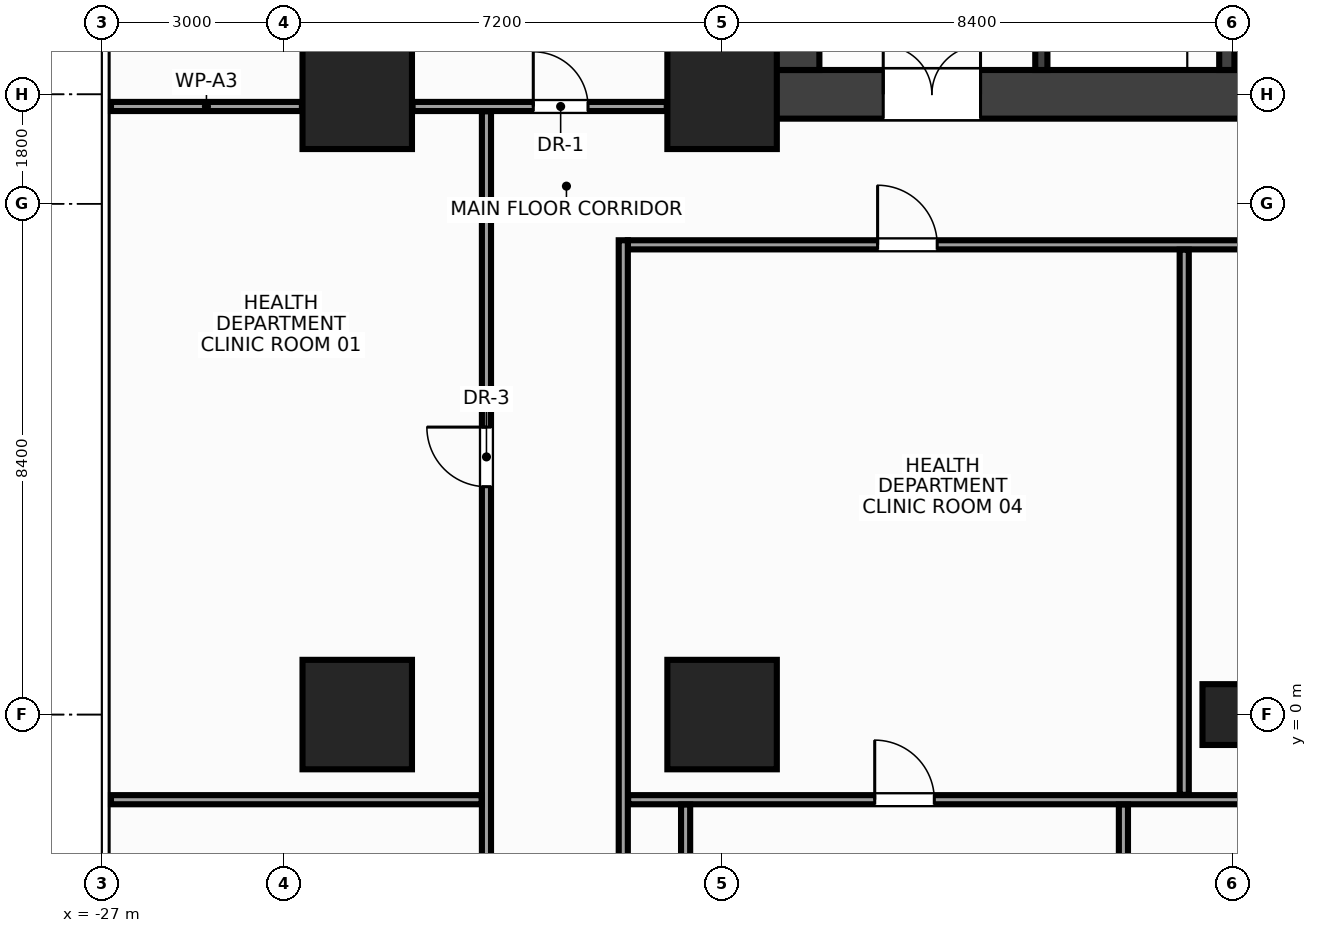
"""IFC4 building model, lengths in metres.
Left out: names, types, materials, properties, quantities, classifications, styles, units other than length and angle.
Written with IfcOpenShell. Run it as: python <this file> out.ifc"""

import sys

from ifc_helpers import new_model, si_unit, direction, frame, frame_2d, origin, origin_2d, place, context, subcontext, project, spatial, rectangle, hollow_rectangle, extrude, source, transform, mapped, element, fill, save


model = new_model("IFC4")
c1 = context("Model", 3, precision=1e-05, world=origin(), true_north=direction((0.0, 1.0)))
c2 = subcontext(c1, "Body", "Model", "MODEL_VIEW")
j1 = project(units=[si_unit("LENGTHUNIT", "METRE"), si_unit("PLANEANGLEUNIT", "RADIAN")], contexts=[c1])
p1 = place(None, origin())
s1 = spatial("IfcSite", under=j1, at=p1, CompositionType="ELEMENT")
p2 = place(p1, origin())
s2 = spatial("IfcBuilding", under=s1, at=p2, CompositionType="ELEMENT")
p3 = place(p2, frame((0.0, 0.0, 52.4)))
s3 = spatial("IfcBuildingStorey", under=s2, at=p3, CompositionType="ELEMENT", Elevation=52.4)
m1 = source(origin(), c2, "Body", "SweptSolid", [
    extrude(rectangle(XDim=32.0, YDim=0.8, at=frame_2d((16.0, 0.0))), origin(), (0.0, 0.0, 1.0), 3.6),
])
p4 = place(p3, frame((-16.0, 10.2, 0.0), z_axis=(0.0, 0.0, 1.0), x_axis=(1.0, 0.0, 0.0)))
e1 = element("IfcWall", 1, at=p4, inside=s3, PredefinedType="SHEAR", context=c2, shape_type="MappedRepresentation", body=[
    mapped(m1, transform((0.0, 0.0, 0.0), x_axis=(1.0, 0.0, 0.0), y_axis=(0.0, 1.0, 0.0), z_axis=(0.0, 0.0, 1.0), scale=1.0)),
])
p5 = place(p4, frame((1.85, 0.0, 0.0)))
e2 = element("IfcOpeningElement", 2, at=p5, cuts=e1, PredefinedType="OPENING", context=c2, shape_type="SweptSolid", body=[
    extrude(rectangle(XDim=1.6, YDim=2.15, at=frame_2d((0.8, 1.075))), frame((0.0, 0.412, 0.0), z_axis=(0.0, -1.0, 0.0), x_axis=(1.0, 0.0, 0.0)), (0.0, 0.0, 1.0), 0.824),
])
p6 = place(p4, frame((28.55, 0.0, 0.0)))
e3 = element("IfcOpeningElement", 3, at=p6, cuts=e1, PredefinedType="OPENING", context=c2, shape_type="SweptSolid", body=[
    extrude(rectangle(XDim=1.6, YDim=2.15, at=frame_2d((0.8, 1.075))), frame((0.0, 0.412, 0.0), z_axis=(0.0, -1.0, 0.0), x_axis=(1.0, 0.0, 0.0)), (0.0, 0.0, 1.0), 0.824),
])
p7 = place(p4, frame((15.25, 0.0, 0.0)))
e4 = element("IfcOpeningElement", 4, at=p7, cuts=e1, PredefinedType="OPENING", context=c2, shape_type="SweptSolid", body=[
    extrude(rectangle(XDim=1.5, YDim=2.2, at=frame_2d((0.75, 1.1))), frame((0.0, 0.412, 0.0), z_axis=(0.0, -1.0, 0.0), x_axis=(1.0, 0.0, 0.0)), (0.0, 0.0, 1.0), 0.824),
])
m2 = source(origin(), c2, "Body", "SweptSolid", [
    extrude(rectangle(XDim=12.8, YDim=0.8, at=frame_2d((6.4, 0.0))), origin(), (0.0, 0.0, 1.0), 3.6),
])
p8 = place(p3, frame((-15.6, 10.6, 0.0), z_axis=(0.0, 0.0, 1.0), x_axis=(0.0, 1.0, 0.0)))
e5 = element("IfcWall", 5, at=p8, inside=s3, PredefinedType="SHEAR", context=c2, shape_type="MappedRepresentation", body=[
    mapped(m2, transform((0.0, 0.0, 0.0), x_axis=(1.0, 0.0, 0.0), y_axis=(0.0, 1.0, 0.0), z_axis=(0.0, 0.0, 1.0), scale=1.0)),
])
m3 = source(origin(), c2, "Body", "SweptSolid", [
    extrude(rectangle(XDim=12.8, YDim=0.25, at=frame_2d((6.4, 0.0))), origin(), (0.0, 0.0, 1.0), 3.6),
])
p9 = place(p3, frame((-8.5, 10.6, 0.0), z_axis=(0.0, 0.0, 1.0), x_axis=(0.0, 1.0, 0.0)))
e6 = element("IfcWall", 6, at=p9, inside=s3, PredefinedType="SHEAR", context=c2, shape_type="MappedRepresentation", body=[
    mapped(m3, transform((0.0, 0.0, 0.0), x_axis=(1.0, 0.0, 0.0), y_axis=(0.0, 1.0, 0.0), z_axis=(0.0, 0.0, 1.0), scale=1.0)),
])
p10 = place(p9, frame((5.9, 0.0, 0.0)))
e7 = element("IfcOpeningElement", 7, at=p10, cuts=e6, PredefinedType="OPENING", context=c2, shape_type="SweptSolid", body=[
    extrude(rectangle(XDim=0.95, YDim=2.15, at=frame_2d((0.475, 1.075))), frame((0.0, 0.137, 0.0), z_axis=(0.0, -1.0, 0.0), x_axis=(1.0, 0.0, 0.0)), (0.0, 0.0, 1.0), 0.274),
])
m4 = source(origin(), c2, "Body", "SweptSolid", [
    extrude(rectangle(XDim=3.05, YDim=0.2, at=frame_2d((1.525, 0.0))), origin(), (0.0, 0.0, 1.0), 3.6),
])
p11 = place(p3, frame((-11.55, 10.6, 0.0), z_axis=(0.0, 0.0, 1.0), x_axis=(0.0, 1.0, 0.0)))
e8 = element("IfcWall", 8, at=p11, inside=s3, PredefinedType="SHEAR", context=c2, shape_type="MappedRepresentation", body=[
    mapped(m4, transform((0.0, 0.0, 0.0), x_axis=(1.0, 0.0, 0.0), y_axis=(0.0, 1.0, 0.0), z_axis=(0.0, 0.0, 1.0), scale=1.0)),
])
p12 = place(p11, frame((0.9, 0.0, 0.0)))
e9 = element("IfcOpeningElement", 9, at=p12, cuts=e8, PredefinedType="OPENING", context=c2, shape_type="SweptSolid", body=[
    extrude(rectangle(XDim=1.1, YDim=2.15, at=frame_2d((0.55, 1.075))), frame((0.0, 0.112, 0.0), z_axis=(0.0, -1.0, 0.0), x_axis=(1.0, 0.0, 0.0)), (0.0, 0.0, 1.0), 0.224),
])
m5 = source(origin(), c2, "Body", "SweptSolid", [
    extrude(rectangle(XDim=1.8, YDim=1.8, at=origin_2d()), origin(), (0.0, 0.0, 1.0), 3.6),
])
for number, where, z_axis, x_axis in (
    (10, (-16.8, 0.0, 0.0), (0.0, 0.0, 1.0), (1.0, 0.0, 0.0)),
    (11, (-16.8, 10.2, 0.0), (0.0, 0.0, 1.0), (1.0, 0.0, 0.0)),
    (12, (-22.8, 0.0, 0.0), (0.0, 0.0, 1.0), (1.0, 0.0, 0.0)),
    (13, (-22.8, 10.2, 0.0), (0.0, 0.0, 1.0), (1.0, 0.0, 0.0)),
):
    element("IfcColumn", number, at=place(p3, frame(where, z_axis=z_axis, x_axis=x_axis)), inside=s3, PredefinedType="COLUMN", context=c2, shape_type="MappedRepresentation", body=[
        mapped(m5, transform((0.0, 0.0, 0.0), x_axis=(1.0, 0.0, 0.0), y_axis=(0.0, 1.0, 0.0), z_axis=(0.0, 0.0, 1.0), scale=1.0)),
    ])
m6 = source(origin(), c2, "Body", "SweptSolid", [
    extrude(hollow_rectangle(XDim=1.0, YDim=1.0, WallThickness=0.045, at=origin_2d()), origin(), (0.0, 0.0, 1.0), 3.6),
])
p13 = place(p3, frame((-8.4, 0.0, 0.0), z_axis=(0.0, 0.0, 1.0), x_axis=(1.0, 0.0, 0.0)))
e14 = element("IfcColumn", 14, at=p13, inside=s3, PredefinedType="COLUMN", context=c2, shape_type="MappedRepresentation", body=[
    mapped(m6, transform((0.0, 0.0, 0.0), x_axis=(1.0, 0.0, 0.0), y_axis=(0.0, 1.0, 0.0), z_axis=(0.0, 0.0, 1.0), scale=1.0)),
])
m7 = source(origin(), c2, "Body", "SweptSolid", [
    extrude(rectangle(XDim=3.14, YDim=0.15, at=frame_2d((1.57, 0.0))), origin(), (0.0, 0.0, 1.0), 2.435),
])
p14 = place(p3, frame((-26.85, 10.0, 0.0), z_axis=(0.0, 0.0, 1.0), x_axis=(1.0, 0.0, 0.0)))
e15 = element("IfcWall", 15, at=p14, inside=s3, PredefinedType="PARTITIONING", context=c2, shape_type="MappedRepresentation", body=[
    mapped(m7, transform((0.0, 0.0, 0.0), x_axis=(1.0, 0.0, 0.0), y_axis=(0.0, 1.0, 0.0), z_axis=(0.0, 0.0, 1.0), scale=1.0)),
])
m8 = source(origin(), c2, "Body", "SweptSolid", [
    extrude(rectangle(XDim=4.18, YDim=0.15, at=frame_2d((2.09, 0.0))), origin(), (0.0, 0.0, 1.0), 2.745),
])
p15 = place(p3, frame((-21.89, 10.0, 0.0), z_axis=(0.0, 0.0, 1.0), x_axis=(1.0, 0.0, 0.0)))
e16 = element("IfcWall", 16, at=p15, inside=s3, PredefinedType="PARTITIONING", context=c2, shape_type="MappedRepresentation", body=[
    mapped(m8, transform((0.0, 0.0, 0.0), x_axis=(1.0, 0.0, 0.0), y_axis=(0.0, 1.0, 0.0), z_axis=(0.0, 0.0, 1.0), scale=1.0)),
])
p16 = place(p15, frame((1.985, 0.0, 0.0)))
e17 = element("IfcOpeningElement", 17, at=p16, cuts=e16, PredefinedType="OPENING", context=c2, shape_type="SweptSolid", body=[
    extrude(rectangle(XDim=0.9, YDim=2.15, at=frame_2d((0.45, 1.075))), frame((0.0, 0.087, 0.0), z_axis=(0.0, -1.0, 0.0), x_axis=(1.0, 0.0, 0.0)), (0.0, 0.0, 1.0), 0.174),
])
m9 = source(origin(), c2, "Body", "SweptSolid", [
    extrude(rectangle(XDim=36.7, YDim=0.15, at=frame_2d((18.35, 0.0))), origin(), (0.0, 0.0, 1.0), 2.745),
])
p17 = place(p3, frame((-18.35, 7.725, 0.0), z_axis=(0.0, 0.0, 1.0), x_axis=(1.0, 0.0, 0.0)))
e18 = element("IfcWall", 18, at=p17, inside=s3, PredefinedType="PARTITIONING", context=c2, shape_type="MappedRepresentation", body=[
    mapped(m9, transform((0.0, 0.0, 0.0), x_axis=(1.0, 0.0, 0.0), y_axis=(0.0, 1.0, 0.0), z_axis=(0.0, 0.0, 1.0), scale=1.0)),
])
p18 = place(p17, frame((33.312, 0.0, 0.0)))
e19 = element("IfcOpeningElement", 19, at=p18, cuts=e18, PredefinedType="OPENING", context=c2, shape_type="SweptSolid", body=[
    extrude(rectangle(XDim=0.98, YDim=2.15, at=frame_2d((0.49, 1.075))), frame((0.0, 0.087, 0.0), z_axis=(0.0, -1.0, 0.0), x_axis=(1.0, 0.0, 0.0)), (0.0, 0.0, 1.0), 0.174),
])
p19 = place(p17, frame((4.107, 0.0, 0.0)))
e20 = element("IfcOpeningElement", 20, at=p19, cuts=e18, PredefinedType="OPENING", context=c2, shape_type="SweptSolid", body=[
    extrude(rectangle(XDim=0.98, YDim=2.15, at=frame_2d((0.49, 1.075))), frame((0.0, 0.087, 0.0), z_axis=(0.0, -1.0, 0.0), x_axis=(1.0, 0.0, 0.0)), (0.0, 0.0, 1.0), 0.174),
])
p20 = place(p17, frame((14.46, 0.0, 0.0)))
e21 = element("IfcOpeningElement", 21, at=p20, cuts=e18, PredefinedType="OPENING", context=c2, shape_type="SweptSolid", body=[
    extrude(rectangle(XDim=0.98, YDim=2.15, at=frame_2d((0.49, 1.075))), frame((0.0, 0.087, 0.0), z_axis=(0.0, -1.0, 0.0), x_axis=(1.0, 0.0, 0.0)), (0.0, 0.0, 1.0), 0.174),
])
p21 = place(p17, frame((25.36, 0.0, 0.0)))
e22 = element("IfcOpeningElement", 22, at=p21, cuts=e18, PredefinedType="OPENING", context=c2, shape_type="SweptSolid", body=[
    extrude(rectangle(XDim=0.98, YDim=2.15, at=frame_2d((0.49, 1.075))), frame((0.0, 0.087, 0.0), z_axis=(0.0, -1.0, 0.0), x_axis=(1.0, 0.0, 0.0)), (0.0, 0.0, 1.0), 0.174),
])
m10 = source(origin(), c2, "Body", "SweptSolid", [
    extrude(rectangle(XDim=24.115, YDim=0.15, at=frame_2d((12.058, 0.0))), origin(), (0.0, 0.0, 1.0), 2.745),
])
p22 = place(p3, frame((-20.675, -14.195, 0.0), z_axis=(0.0, 0.0, 1.0), x_axis=(0.0, 1.0, 0.0)))
e23 = element("IfcWall", 23, at=p22, inside=s3, PredefinedType="PARTITIONING", context=c2, shape_type="MappedRepresentation", body=[
    mapped(m10, transform((0.0, 0.0, 0.0), x_axis=(1.0, 0.0, 0.0), y_axis=(0.0, 1.0, 0.0), z_axis=(0.0, 0.0, 1.0), scale=1.0)),
])
p23 = place(p22, frame((17.942, 0.0, 0.0)))
e24 = element("IfcOpeningElement", 24, at=p23, cuts=e23, PredefinedType="OPENING", context=c2, shape_type="SweptSolid", body=[
    extrude(rectangle(XDim=0.98, YDim=2.15, at=frame_2d((0.49, 1.075))), frame((0.0, 0.087, 0.0), z_axis=(0.0, -1.0, 0.0), x_axis=(1.0, 0.0, 0.0)), (0.0, 0.0, 1.0), 0.174),
])
m11 = source(origin(), c2, "Body", "SweptSolid", [
    extrude(rectangle(XDim=21.995, YDim=0.15, at=frame_2d((10.998, 0.0))), origin(), (0.0, 0.0, 1.0), 2.745),
])
p24 = place(p3, frame((-18.425, -14.195, 0.0), z_axis=(0.0, 0.0, 1.0), x_axis=(0.0, 1.0, 0.0)))
e25 = element("IfcWall", 25, at=p24, inside=s3, PredefinedType="PARTITIONING", context=c2, shape_type="MappedRepresentation", body=[
    mapped(m11, transform((0.0, 0.0, 0.0), x_axis=(1.0, 0.0, 0.0), y_axis=(0.0, 1.0, 0.0), z_axis=(0.0, 0.0, 1.0), scale=1.0)),
])
m12 = source(origin(), c2, "Body", "SweptSolid", [
    extrude(rectangle(XDim=6.095, YDim=0.15, at=frame_2d((3.048, 0.0))), origin(), (0.0, 0.0, 1.0), 2.745),
])
p25 = place(p3, frame((-26.85, -1.4, 0.0), z_axis=(0.0, 0.0, 1.0), x_axis=(1.0, 0.0, 0.0)))
e26 = element("IfcWall", 26, at=p25, inside=s3, PredefinedType="PARTITIONING", context=c2, shape_type="MappedRepresentation", body=[
    mapped(m12, transform((0.0, 0.0, 0.0), x_axis=(1.0, 0.0, 0.0), y_axis=(0.0, 1.0, 0.0), z_axis=(0.0, 0.0, 1.0), scale=1.0)),
])
m13 = source(origin(), c2, "Body", "SweptSolid", [
    extrude(rectangle(XDim=36.69, YDim=0.15, at=frame_2d((18.345, 0.0))), origin(), (0.0, 0.0, 1.0), 2.745),
])
p26 = place(p3, frame((-18.345, -1.4, 0.0), z_axis=(0.0, 0.0, 1.0), x_axis=(1.0, 0.0, 0.0)))
e27 = element("IfcWall", 27, at=p26, inside=s3, PredefinedType="PARTITIONING", context=c2, shape_type="MappedRepresentation", body=[
    mapped(m13, transform((0.0, 0.0, 0.0), x_axis=(1.0, 0.0, 0.0), y_axis=(0.0, 1.0, 0.0), z_axis=(0.0, 0.0, 1.0), scale=1.0)),
])
p27 = place(p26, frame((14.455, 0.0, 0.0)))
e28 = element("IfcOpeningElement", 28, at=p27, cuts=e27, PredefinedType="OPENING", context=c2, shape_type="SweptSolid", body=[
    extrude(rectangle(XDim=0.98, YDim=2.15, at=frame_2d((0.49, 1.075))), frame((0.0, 0.087, 0.0), z_axis=(0.0, -1.0, 0.0), x_axis=(1.0, 0.0, 0.0)), (0.0, 0.0, 1.0), 0.174),
])
p28 = place(p26, frame((4.055, 0.0, 0.0)))
e29 = element("IfcOpeningElement", 29, at=p28, cuts=e27, PredefinedType="OPENING", context=c2, shape_type="SweptSolid", body=[
    extrude(rectangle(XDim=0.98, YDim=2.15, at=frame_2d((0.49, 1.075))), frame((0.0, 0.087, 0.0), z_axis=(0.0, -1.0, 0.0), x_axis=(1.0, 0.0, 0.0)), (0.0, 0.0, 1.0), 0.174),
])
p29 = place(p26, frame((32.415, 0.0, 0.0)))
e30 = element("IfcOpeningElement", 30, at=p29, cuts=e27, PredefinedType="OPENING", context=c2, shape_type="SweptSolid", body=[
    extrude(rectangle(XDim=0.98, YDim=2.15, at=frame_2d((0.49, 1.075))), frame((0.0, 0.087, 0.0), z_axis=(0.0, -1.0, 0.0), x_axis=(1.0, 0.0, 0.0)), (0.0, 0.0, 1.0), 0.174),
])
m14 = source(origin(), c2, "Body", "SweptSolid", [
    extrude(rectangle(XDim=8.965, YDim=0.15, at=frame_2d((4.482, 0.0))), origin(), (0.0, 0.0, 1.0), 2.645),
])
p30 = place(p3, frame((-9.2, -1.32, 0.0), z_axis=(0.0, 0.0, 1.0), x_axis=(0.0, 1.0, 0.0)))
e31 = element("IfcWall", 31, at=p30, inside=s3, PredefinedType="PARTITIONING", context=c2, shape_type="MappedRepresentation", body=[
    mapped(m14, transform((0.0, 0.0, 0.0), x_axis=(1.0, 0.0, 0.0), y_axis=(0.0, 1.0, 0.0), z_axis=(0.0, 0.0, 1.0), scale=1.0)),
])
m15 = source(origin(), c2, "Body", "SweptSolid", [
    extrude(rectangle(XDim=8.41, YDim=0.15, at=frame_2d((4.205, 0.0))), origin(), (0.0, 0.0, 1.0), 3.36),
])
p31 = place(p3, frame((-17.4, -9.89, 0.0), z_axis=(0.0, 0.0, 1.0), x_axis=(0.0, 1.0, 0.0)))
e32 = element("IfcWall", 32, at=p31, inside=s3, PredefinedType="PARTITIONING", context=c2, shape_type="MappedRepresentation", body=[
    mapped(m15, transform((0.0, 0.0, 0.0), x_axis=(1.0, 0.0, 0.0), y_axis=(0.0, 1.0, 0.0), z_axis=(0.0, 0.0, 1.0), scale=1.0)),
])
m16 = source(origin(), c2, "Body", "SweptSolid", [
    extrude(rectangle(XDim=25.37, YDim=0.15, at=frame_2d((12.685, 0.0))), origin(), (0.0, 0.0, 1.0), 2.745),
])
p32 = place(p3, frame((-10.2, -26.85, 0.0), z_axis=(0.0, 0.0, 1.0), x_axis=(0.0, 1.0, 0.0)))
e33 = element("IfcWall", 33, at=p32, inside=s3, PredefinedType="PARTITIONING", context=c2, shape_type="MappedRepresentation", body=[
    mapped(m16, transform((0.0, 0.0, 0.0), x_axis=(1.0, 0.0, 0.0), y_axis=(0.0, 1.0, 0.0), z_axis=(0.0, 0.0, 1.0), scale=1.0)),
])
m17 = source(origin(), c2, "Body", "SweptSolid", [
    extrude(rectangle(XDim=1.6, YDim=2.15, at=frame_2d((0.8, 1.075))), frame((0.0, 0.025, 0.0), z_axis=(0.0, -1.0, 0.0), x_axis=(1.0, 0.0, 0.0)), (0.0, 0.0, 1.0), 0.05),
])
p33 = place(p5, origin())
e34 = element("IfcDoor", 34, at=p33, inside=s3, OperationType="DOUBLE_DOOR_SINGLE_SWING", PredefinedType="DOOR", context=c2, shape_type="MappedRepresentation", body=[
    mapped(m17, transform((0.0, 0.0, 0.0), x_axis=(1.0, 0.0, 0.0), y_axis=(0.0, 1.0, 0.0), z_axis=(0.0, 0.0, 1.0), scale=1.0)),
])
fill(e2, e34)
m18 = source(origin(), c2, "Body", "SweptSolid", [
    extrude(rectangle(XDim=0.9, YDim=2.15, at=frame_2d((0.45, 1.075))), frame((0.0, 0.025, 0.0), z_axis=(0.0, -1.0, 0.0), x_axis=(1.0, 0.0, 0.0)), (0.0, 0.0, 1.0), 0.05),
])
p34 = place(p16, origin())
e35 = element("IfcDoor", 35, at=p34, inside=s3, OperationType="SINGLE_SWING_LEFT", PredefinedType="DOOR", context=c2, shape_type="MappedRepresentation", body=[
    mapped(m18, transform((0.0, 0.0, 0.0), x_axis=(1.0, 0.0, 0.0), y_axis=(0.0, 1.0, 0.0), z_axis=(0.0, 0.0, 1.0), scale=1.0)),
])
fill(e17, e35)
m19 = source(origin(), c2, "Body", "SweptSolid", [
    extrude(rectangle(XDim=0.98, YDim=2.15, at=frame_2d((0.49, 1.075))), frame((0.0, 0.025, 0.0), z_axis=(0.0, -1.0, 0.0), x_axis=(1.0, 0.0, 0.0)), (0.0, 0.0, 1.0), 0.05),
])
p35 = place(p23, origin())
e36 = element("IfcDoor", 36, at=p35, inside=s3, OperationType="SINGLE_SWING_RIGHT", PredefinedType="DOOR", context=c2, shape_type="MappedRepresentation", body=[
    mapped(m19, transform((0.0, 0.0, 0.0), x_axis=(1.0, 0.0, 0.0), y_axis=(0.0, 1.0, 0.0), z_axis=(0.0, 0.0, 1.0), scale=1.0)),
])
fill(e24, e36)
p36 = place(p19, origin())
e37 = element("IfcDoor", 37, at=p36, inside=s3, OperationType="SINGLE_SWING_LEFT", PredefinedType="DOOR", context=c2, shape_type="MappedRepresentation", body=[
    mapped(m19, transform((0.0, 0.0, 0.0), x_axis=(1.0, 0.0, 0.0), y_axis=(0.0, 1.0, 0.0), z_axis=(0.0, 0.0, 1.0), scale=1.0)),
])
fill(e20, e37)
p37 = place(p28, origin())
e38 = element("IfcDoor", 38, at=p37, inside=s3, OperationType="SINGLE_SWING_LEFT", PredefinedType="DOOR", context=c2, shape_type="MappedRepresentation", body=[
    mapped(m19, transform((0.0, 0.0, 0.0), x_axis=(1.0, 0.0, 0.0), y_axis=(0.0, 1.0, 0.0), z_axis=(0.0, 0.0, 1.0), scale=1.0)),
])
fill(e29, e38)
save(model, sys.argv[1])
